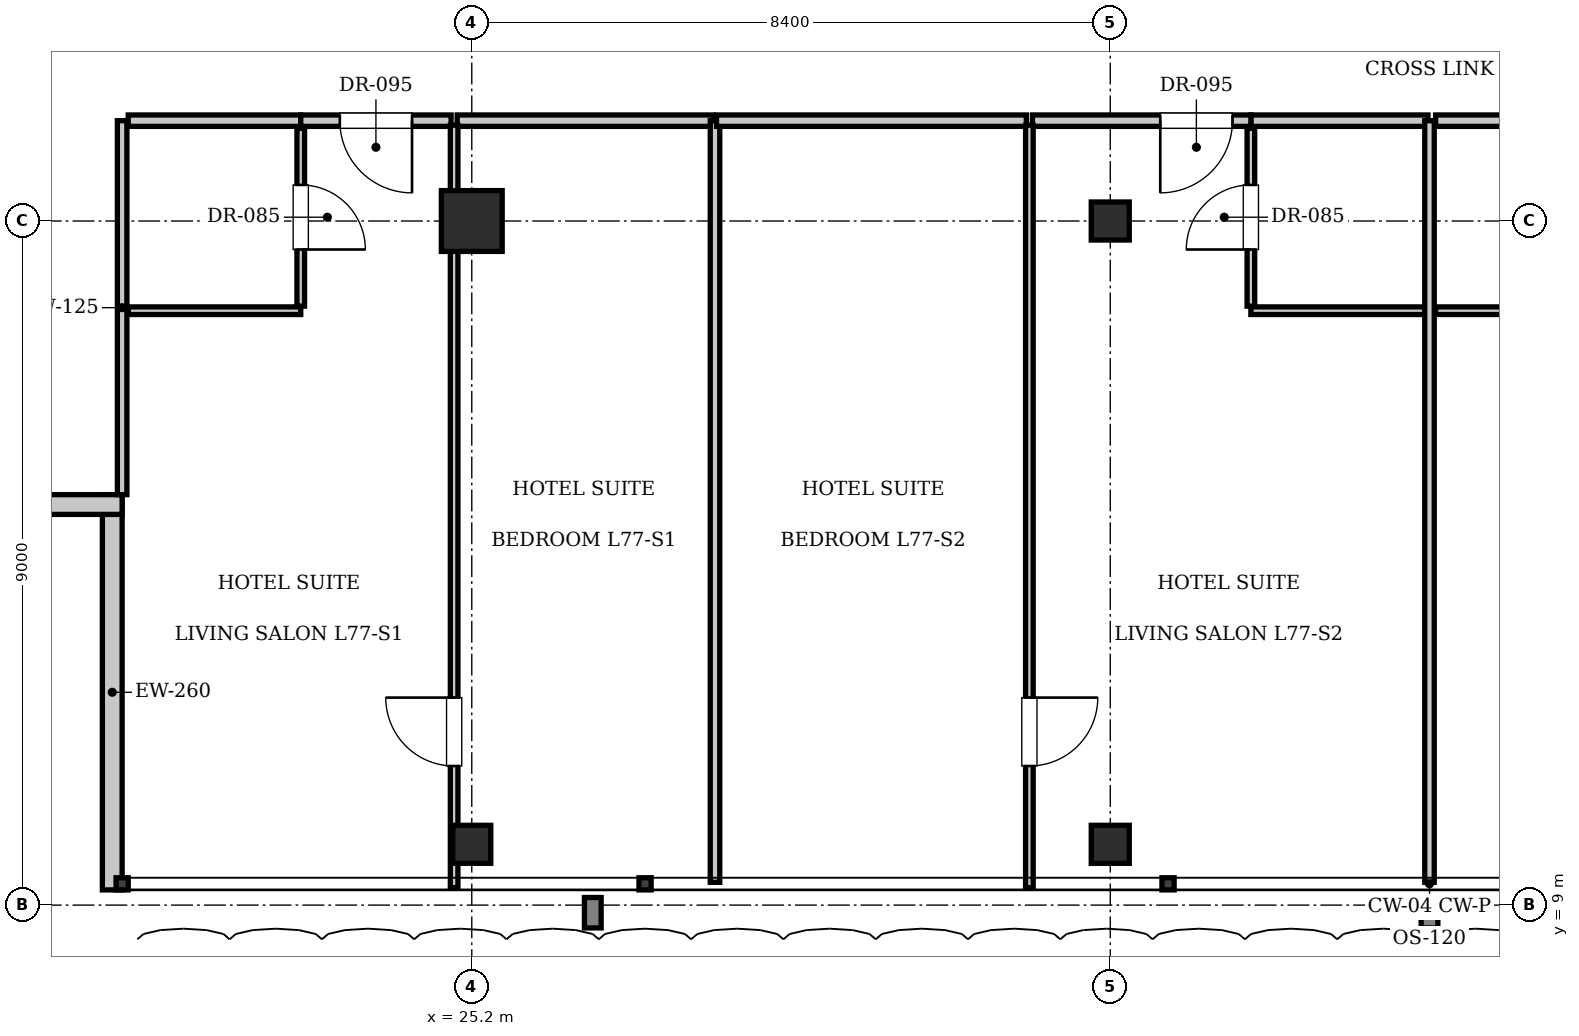
"""IFC4 building model, lengths in metres.
Left out: names, types, materials, properties, quantities, classifications, styles, units other than length and angle.
Written with IfcOpenShell. Run it as: python <this file> out.ifc"""

import sys

from ifc_helpers import new_model, si_unit, direction, frame, frame_2d, origin, origin_2d, place, context, subcontext, project, spatial, rectangle, i_section, extrude, element, fill, save


model = new_model("IFC4")
c1 = context("Model", 3, precision=1e-05, world=origin(), true_north=direction((0.0, 1.0)))
c2 = subcontext(c1, "Body", "Model", "MODEL_VIEW")
j1 = project(units=[si_unit("LENGTHUNIT", "METRE"), si_unit("PLANEANGLEUNIT", "RADIAN")], contexts=[c1])
p1 = place(None, origin())
s1 = spatial("IfcSite", under=j1, at=p1, CompositionType="ELEMENT")
p2 = place(p1, origin())
s2 = spatial("IfcBuilding", under=s1, at=p2, CompositionType="ELEMENT")
p3 = place(p2, frame((0.0, 0.0, 312.55)))
s3 = spatial("IfcBuildingStorey", under=s2, at=p3, CompositionType="ELEMENT", Elevation=312.55)
p4 = place(p3, frame((25.2, 18.0, 0.0), z_axis=(0.0, 0.0, 1.0), x_axis=(1.0, 0.0, 0.0)))
e1 = element("IfcColumn", 1, at=p4, inside=s3, PredefinedType="COLUMN", context=c2, shape_type="SweptSolid", body=[
    extrude(rectangle(XDim=0.8, YDim=0.8, at=origin_2d()), origin(), (0.0, 0.0, 1.0), 3.85),
])
for number, where, z_axis, x_axis in (
    (2, (33.6, 18.0, 0.0), (0.0, 0.0, 1.0), (1.0, 0.0, 0.0)),
    (3, (25.2, 9.8, 0.0), (0.0, 0.0, 1.0), (1.0, 0.0, 0.0)),
    (4, (33.6, 9.8, 0.0), (0.0, 0.0, 1.0), (1.0, 0.0, 0.0)),
):
    element("IfcColumn", number, at=place(p3, frame(where, z_axis=z_axis, x_axis=x_axis)), inside=s3, PredefinedType="COLUMN", context=c2, shape_type="SweptSolid", body=[
        extrude(i_section(OverallWidth=0.5, OverallDepth=0.5, WebThickness=0.022, FlangeThickness=0.032, at=origin_2d()), origin(), (0.0, 0.0, 1.0), 3.85),
    ])
p5 = place(p3, frame((20.47, 9.2, 0.0), z_axis=(0.0, 0.0, 1.0), x_axis=(0.0, 1.0, 0.0)))
e5 = element("IfcWall", 5, at=p5, inside=s3, PredefinedType="SOLIDWALL", context=c2, shape_type="SweptSolid", body=[
    extrude(rectangle(XDim=5.2, YDim=0.26, at=frame_2d((2.6, 0.0))), origin(), (0.0, 0.0, 1.0), 3.55),
])
p6 = place(p3, frame((20.6, 14.27, 0.0), z_axis=(0.0, 0.0, 1.0), x_axis=(-1.0, 0.0, 0.0)))
e6 = element("IfcWall", 6, at=p6, inside=s3, PredefinedType="SOLIDWALL", context=c2, shape_type="SweptSolid", body=[
    extrude(rectangle(XDim=5.2, YDim=0.26, at=frame_2d((2.6, 0.0))), origin(), (0.0, 0.0, 1.0), 3.55),
])
p7 = place(p6, frame((1.6, 0.0, 0.9)))
e7 = element("IfcOpeningElement", 7, at=p7, cuts=e6, PredefinedType="OPENING", context=c2, shape_type="SweptSolid", body=[
    extrude(rectangle(XDim=2.0, YDim=2.2, at=frame_2d((1.0, 1.1))), frame((0.0, 0.14, 0.0), z_axis=(0.0, -1.0, 0.0), x_axis=(1.0, 0.0, 0.0)), (0.0, 0.0, 1.0), 0.28),
])
p8 = place(p3, frame((20.6, 14.4, 0.0), z_axis=(0.0, 0.0, 1.0), x_axis=(0.0, 1.0, 0.0)))
e8 = element("IfcWall", 8, at=p8, inside=s3, PredefinedType="PARTITIONING", context=c2, shape_type="SweptSolid", body=[
    extrude(rectangle(XDim=4.92, YDim=0.125, at=frame_2d((2.46, 0.0))), origin(), (0.0, 0.0, 1.0), 3.55),
])
p9 = place(p3, frame((20.68, 19.32, 0.0), z_axis=(0.0, 0.0, 1.0), x_axis=(1.0, 0.0, 0.0)))
e9 = element("IfcWall", 9, at=p9, inside=s3, PredefinedType="PARTITIONING", context=c2, shape_type="SweptSolid", body=[
    extrude(rectangle(XDim=2.27, YDim=0.15, at=frame_2d((1.135, 0.0))), origin(), (0.0, 0.0, 1.0), 3.55),
])
p10 = place(p3, frame((20.68, 16.82, 0.0), z_axis=(0.0, 0.0, 1.0), x_axis=(1.0, 0.0, 0.0)))
e10 = element("IfcWall", 10, at=p10, inside=s3, PredefinedType="PARTITIONING", context=c2, shape_type="SweptSolid", body=[
    extrude(rectangle(XDim=2.27, YDim=0.1, at=frame_2d((1.135, 0.0))), origin(), (0.0, 0.0, 1.0), 3.55),
])
p11 = place(p3, frame((22.95, 16.88, 0.0), z_axis=(0.0, 0.0, 1.0), x_axis=(0.0, 1.0, 0.0)))
e11 = element("IfcWall", 11, at=p11, inside=s3, PredefinedType="PARTITIONING", context=c2, shape_type="SweptSolid", body=[
    extrude(rectangle(XDim=2.34, YDim=0.1, at=frame_2d((1.17, 0.0))), origin(), (0.0, 0.0, 1.0), 3.55),
])
p12 = place(p11, frame((0.745, 0.0, 0.0)))
e12 = element("IfcOpeningElement", 12, at=p12, cuts=e11, PredefinedType="OPENING", context=c2, shape_type="SweptSolid", body=[
    extrude(rectangle(XDim=0.85, YDim=2.1, at=frame_2d((0.425, 1.05))), frame((0.0, 0.06, 0.0), z_axis=(0.0, -1.0, 0.0), x_axis=(1.0, 0.0, 0.0)), (0.0, 0.0, 1.0), 0.12),
])
p13 = place(p3, frame((22.95, 19.32, 0.0), z_axis=(0.0, 0.0, 1.0), x_axis=(1.0, 0.0, 0.0)))
e13 = element("IfcWall", 13, at=p13, inside=s3, PredefinedType="PARTITIONING", context=c2, shape_type="SweptSolid", body=[
    extrude(rectangle(XDim=1.978, YDim=0.15, at=frame_2d((0.989, 0.0))), origin(), (0.0, 0.0, 1.0), 3.55),
])
p14 = place(p13, frame((0.514, 0.0, 0.0)))
e14 = element("IfcOpeningElement", 14, at=p14, cuts=e13, PredefinedType="OPENING", context=c2, shape_type="SweptSolid", body=[
    extrude(rectangle(XDim=0.95, YDim=2.15, at=frame_2d((0.475, 1.075))), frame((0.0, 0.085, 0.0), z_axis=(0.0, -1.0, 0.0), x_axis=(1.0, 0.0, 0.0)), (0.0, 0.0, 1.0), 0.17),
])
p15 = place(p3, frame((25.008, 19.32, 0.0), z_axis=(0.0, 0.0, 1.0), x_axis=(1.0, 0.0, 0.0)))
e15 = element("IfcWall", 15, at=p15, inside=s3, PredefinedType="PARTITIONING", context=c2, shape_type="SweptSolid", body=[
    extrude(rectangle(XDim=3.372, YDim=0.15, at=frame_2d((1.686, 0.0))), origin(), (0.0, 0.0, 1.0), 3.55),
])
p16 = place(p3, frame((24.968, 9.23, 0.0), z_axis=(0.0, 0.0, 1.0), x_axis=(0.0, 1.0, 0.0)))
e16 = element("IfcWall", 16, at=p16, inside=s3, PredefinedType="PARTITIONING", context=c2, shape_type="SweptSolid", body=[
    extrude(rectangle(XDim=10.03, YDim=0.1, at=frame_2d((5.015, 0.0))), origin(), (0.0, 0.0, 1.0), 3.55),
])
p17 = place(p16, frame((1.6, 0.0, 0.0)))
e17 = element("IfcOpeningElement", 17, at=p17, cuts=e16, PredefinedType="OPENING", context=c2, shape_type="SweptSolid", body=[
    extrude(rectangle(XDim=0.9, YDim=2.1, at=frame_2d((0.45, 1.05))), frame((0.0, 0.06, 0.0), z_axis=(0.0, -1.0, 0.0), x_axis=(1.0, 0.0, 0.0)), (0.0, 0.0, 1.0), 0.12),
])
p18 = place(p3, frame((28.4, 9.3, 0.0), z_axis=(0.0, 0.0, 1.0), x_axis=(0.0, 1.0, 0.0)))
e18 = element("IfcWall", 18, at=p18, inside=s3, PredefinedType="PARTITIONING", context=c2, shape_type="SweptSolid", body=[
    extrude(rectangle(XDim=10.02, YDim=0.125, at=frame_2d((5.01, 0.0))), origin(), (0.0, 0.0, 1.0), 3.55),
])
p19 = place(p3, frame((35.45, 19.32, 0.0), z_axis=(0.0, 0.0, 1.0), x_axis=(1.0, 0.0, 0.0)))
e19 = element("IfcWall", 19, at=p19, inside=s3, PredefinedType="PARTITIONING", context=c2, shape_type="SweptSolid", body=[
    extrude(rectangle(XDim=2.33, YDim=0.15, at=frame_2d((1.165, 0.0))), origin(), (0.0, 0.0, 1.0), 3.55),
])
p20 = place(p3, frame((35.45, 16.82, 0.0), z_axis=(0.0, 0.0, 1.0), x_axis=(1.0, 0.0, 0.0)))
e20 = element("IfcWall", 20, at=p20, inside=s3, PredefinedType="PARTITIONING", context=c2, shape_type="SweptSolid", body=[
    extrude(rectangle(XDim=2.31, YDim=0.1, at=frame_2d((1.155, 0.0))), origin(), (0.0, 0.0, 1.0), 3.55),
])
p21 = place(p3, frame((35.45, 16.88, 0.0), z_axis=(0.0, 0.0, 1.0), x_axis=(0.0, 1.0, 0.0)))
e21 = element("IfcWall", 21, at=p21, inside=s3, PredefinedType="PARTITIONING", context=c2, shape_type="SweptSolid", body=[
    extrude(rectangle(XDim=2.34, YDim=0.1, at=frame_2d((1.17, 0.0))), origin(), (0.0, 0.0, 1.0), 3.55),
])
p22 = place(p21, frame((0.745, 0.0, 0.0)))
e22 = element("IfcOpeningElement", 22, at=p22, cuts=e21, PredefinedType="OPENING", context=c2, shape_type="SweptSolid", body=[
    extrude(rectangle(XDim=0.85, YDim=2.1, at=frame_2d((0.425, 1.05))), frame((0.0, 0.06, 0.0), z_axis=(0.0, -1.0, 0.0), x_axis=(1.0, 0.0, 0.0)), (0.0, 0.0, 1.0), 0.12),
])
p23 = place(p3, frame((28.42, 19.32, 0.0), z_axis=(0.0, 0.0, 1.0), x_axis=(1.0, 0.0, 0.0)))
e23 = element("IfcWall", 23, at=p23, inside=s3, PredefinedType="PARTITIONING", context=c2, shape_type="SweptSolid", body=[
    extrude(rectangle(XDim=4.076, YDim=0.15, at=frame_2d((2.038, 0.0))), origin(), (0.0, 0.0, 1.0), 3.55),
])
p24 = place(p3, frame((32.576, 19.32, 0.0), z_axis=(0.0, 0.0, 1.0), x_axis=(1.0, 0.0, 0.0)))
e24 = element("IfcWall", 24, at=p24, inside=s3, PredefinedType="PARTITIONING", context=c2, shape_type="SweptSolid", body=[
    extrude(rectangle(XDim=2.874, YDim=0.15, at=frame_2d((1.437, 0.0))), origin(), (0.0, 0.0, 1.0), 3.55),
])
p25 = place(p24, frame((1.682, 0.0, 0.0)))
e25 = element("IfcOpeningElement", 25, at=p25, cuts=e24, PredefinedType="OPENING", context=c2, shape_type="SweptSolid", body=[
    extrude(rectangle(XDim=0.95, YDim=2.15, at=frame_2d((0.475, 1.075))), frame((0.0, 0.085, 0.0), z_axis=(0.0, -1.0, 0.0), x_axis=(1.0, 0.0, 0.0)), (0.0, 0.0, 1.0), 0.17),
])
p26 = place(p3, frame((32.536, 9.23, 0.0), z_axis=(0.0, 0.0, 1.0), x_axis=(0.0, 1.0, 0.0)))
e26 = element("IfcWall", 26, at=p26, inside=s3, PredefinedType="PARTITIONING", context=c2, shape_type="SweptSolid", body=[
    extrude(rectangle(XDim=10.03, YDim=0.1, at=frame_2d((5.015, 0.0))), origin(), (0.0, 0.0, 1.0), 3.55),
])
p27 = place(p26, frame((1.6, 0.0, 0.0)))
e27 = element("IfcOpeningElement", 27, at=p27, cuts=e26, PredefinedType="OPENING", context=c2, shape_type="SweptSolid", body=[
    extrude(rectangle(XDim=0.9, YDim=2.1, at=frame_2d((0.45, 1.05))), frame((0.0, 0.06, 0.0), z_axis=(0.0, -1.0, 0.0), x_axis=(1.0, 0.0, 0.0)), (0.0, 0.0, 1.0), 0.12),
])
p28 = place(p3, frame((37.8, 9.3, 0.0), z_axis=(0.0, 0.0, 1.0), x_axis=(0.0, 1.0, 0.0)))
e28 = element("IfcWall", 28, at=p28, inside=s3, PredefinedType="PARTITIONING", context=c2, shape_type="SweptSolid", body=[
    extrude(rectangle(XDim=10.02, YDim=0.125, at=frame_2d((5.01, 0.0))), origin(), (0.0, 0.0, 1.0), 3.244),
])
p29 = place(p3, frame((37.88, 19.32, 0.0), z_axis=(0.0, 0.0, 1.0), x_axis=(1.0, 0.0, 0.0)))
e29 = element("IfcWall", 29, at=p29, inside=s3, PredefinedType="PARTITIONING", context=c2, shape_type="SweptSolid", body=[
    extrude(rectangle(XDim=2.27, YDim=0.15, at=frame_2d((1.135, 0.0))), origin(), (0.0, 0.0, 1.0), 3.55),
])
p30 = place(p3, frame((37.88, 16.82, 0.0), z_axis=(0.0, 0.0, 1.0), x_axis=(1.0, 0.0, 0.0)))
e30 = element("IfcWall", 30, at=p30, inside=s3, PredefinedType="PARTITIONING", context=c2, shape_type="SweptSolid", body=[
    extrude(rectangle(XDim=2.27, YDim=0.1, at=frame_2d((1.135, 0.0))), origin(), (0.0, 0.0, 1.0), 3.55),
])
p31 = place(p12, frame((0.85, 0.0, 0.0), z_axis=(0.0, 0.0, 1.0), x_axis=(-1.0, 0.0, 0.0)))
e31 = element("IfcDoor", 31, at=p31, inside=s3, OperationType="SINGLE_SWING_RIGHT", PredefinedType="DOOR", context=c2, shape_type="SweptSolid", body=[
    extrude(rectangle(XDim=0.85, YDim=2.1, at=frame_2d((0.425, 1.05))), frame((0.0, 0.025, 0.0), z_axis=(0.0, -1.0, 0.0), x_axis=(1.0, 0.0, 0.0)), (0.0, 0.0, 1.0), 0.05),
])
fill(e12, e31)
p32 = place(p14, frame((0.95, 0.0, 0.0), z_axis=(0.0, 0.0, 1.0), x_axis=(-1.0, 0.0, 0.0)))
e32 = element("IfcDoor", 32, at=p32, inside=s3, OperationType="SINGLE_SWING_LEFT", PredefinedType="DOOR", context=c2, shape_type="SweptSolid", body=[
    extrude(rectangle(XDim=0.95, YDim=2.15, at=frame_2d((0.475, 1.075))), frame((0.0, 0.025, 0.0), z_axis=(0.0, -1.0, 0.0), x_axis=(1.0, 0.0, 0.0)), (0.0, 0.0, 1.0), 0.05),
])
fill(e14, e32)
p33 = place(p17, origin())
e33 = element("IfcDoor", 33, at=p33, inside=s3, OperationType="SINGLE_SWING_RIGHT", PredefinedType="DOOR", context=c2, shape_type="SweptSolid", body=[
    extrude(rectangle(XDim=0.9, YDim=2.1, at=frame_2d((0.45, 1.05))), frame((0.0, 0.025, 0.0), z_axis=(0.0, -1.0, 0.0), x_axis=(1.0, 0.0, 0.0)), (0.0, 0.0, 1.0), 0.05),
])
fill(e17, e33)
p34 = place(p22, origin())
e34 = element("IfcDoor", 34, at=p34, inside=s3, OperationType="SINGLE_SWING_LEFT", PredefinedType="DOOR", context=c2, shape_type="SweptSolid", body=[
    extrude(rectangle(XDim=0.85, YDim=2.1, at=frame_2d((0.425, 1.05))), frame((0.0, 0.025, 0.0), z_axis=(0.0, -1.0, 0.0), x_axis=(1.0, 0.0, 0.0)), (0.0, 0.0, 1.0), 0.05),
])
fill(e22, e34)
p35 = place(p25, frame((0.95, 0.0, 0.0), z_axis=(0.0, 0.0, 1.0), x_axis=(-1.0, 0.0, 0.0)))
e35 = element("IfcDoor", 35, at=p35, inside=s3, OperationType="SINGLE_SWING_RIGHT", PredefinedType="DOOR", context=c2, shape_type="SweptSolid", body=[
    extrude(rectangle(XDim=0.95, YDim=2.15, at=frame_2d((0.475, 1.075))), frame((0.0, 0.025, 0.0), z_axis=(0.0, -1.0, 0.0), x_axis=(1.0, 0.0, 0.0)), (0.0, 0.0, 1.0), 0.05),
])
fill(e25, e35)
p36 = place(p27, frame((0.9, 0.0, 0.0), z_axis=(0.0, 0.0, 1.0), x_axis=(-1.0, 0.0, 0.0)))
e36 = element("IfcDoor", 36, at=p36, inside=s3, OperationType="SINGLE_SWING_LEFT", PredefinedType="DOOR", context=c2, shape_type="SweptSolid", body=[
    extrude(rectangle(XDim=0.9, YDim=2.1, at=frame_2d((0.45, 1.05))), frame((0.0, 0.025, 0.0), z_axis=(0.0, -1.0, 0.0), x_axis=(1.0, 0.0, 0.0)), (0.0, 0.0, 1.0), 0.05),
])
fill(e27, e36)
save(model, sys.argv[1])
